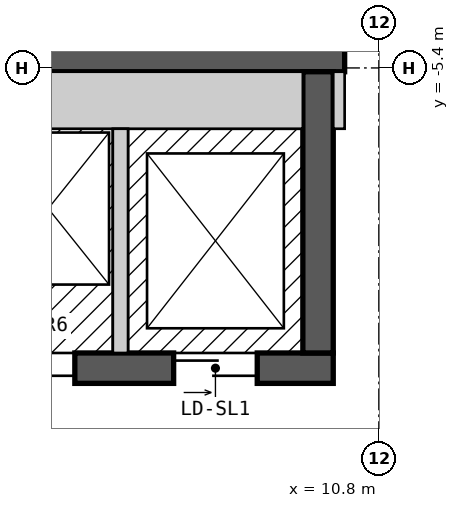
"""IFC4 building model, lengths in metres.
Left out: names, types, materials, properties, quantities, classifications, styles, units other than length and angle.
Written with IfcOpenShell. Run it as: python <this file> out.ifc"""

import sys

from ifc_helpers import new_model, si_unit, direction, frame, frame_2d, origin, place, context, subcontext, project, spatial, rectangle, extrude, element, fill, save


model = new_model("IFC4")
c1 = context("Model", 3, precision=1e-05, world=origin(), true_north=direction((0.0, 1.0)))
c2 = subcontext(c1, "Body", "Model", "MODEL_VIEW")
j1 = project(units=[si_unit("LENGTHUNIT", "METRE"), si_unit("PLANEANGLEUNIT", "RADIAN")], contexts=[c1])
p1 = place(None, origin())
s1 = spatial("IfcSite", under=j1, at=p1, CompositionType="ELEMENT")
p2 = place(p1, origin())
s2 = spatial("IfcBuilding", under=s1, at=p2, CompositionType="ELEMENT")
p3 = place(p2, frame((0.0, 0.0, 226.8)))
s3 = spatial("IfcBuildingStorey", under=s2, at=p3, CompositionType="ELEMENT", Elevation=226.8)
p4 = place(p3, frame((-13.3, -5.225, 0.0), z_axis=(0.0, 0.0, 1.0), x_axis=(1.0, 0.0, 0.0)))
e1 = element("IfcWall", 1, at=p4, inside=s3, PredefinedType="SHEAR", context=c2, shape_type="SweptSolid", body=[
    extrude(rectangle(XDim=26.6, YDim=0.45, at=frame_2d((13.3, 0.0))), origin(), (0.0, 0.0, 1.0), 2.7),
])
p5 = place(p4, frame((23.65, 0.0, 0.0)))
e2 = element("IfcOpeningElement", 2, at=p5, cuts=e1, PredefinedType="OPENING", context=c2, shape_type="SweptSolid", body=[
    extrude(rectangle(XDim=1.2, YDim=2.1, at=frame_2d((0.6, 1.05))), frame((0.0, 0.235, 0.0), z_axis=(0.0, -1.0, 0.0), x_axis=(1.0, 0.0, 0.0)), (0.0, 0.0, 1.0), 0.47),
])
p6 = place(p3, frame((-12.85, -9.35, 0.0), z_axis=(0.0, 0.0, 1.0), x_axis=(1.0, 0.0, 0.0)))
e3 = element("IfcWall", 3, at=p6, inside=s3, PredefinedType="SHEAR", context=c2, shape_type="SweptSolid", body=[
    extrude(rectangle(XDim=23.05, YDim=0.4, at=frame_2d((11.525, 0.0))), origin(), (0.0, 0.0, 1.0), 2.7),
])
p7 = place(p6, frame((1.45, 0.0, 0.0)))
e4 = element("IfcOpeningElement", 4, at=p7, cuts=e3, PredefinedType="OPENING", context=c2, shape_type="SweptSolid", body=[
    extrude(rectangle(XDim=1.1, YDim=2.1, at=frame_2d((0.55, 1.05))), frame((0.0, 0.21, 0.0), z_axis=(0.0, -1.0, 0.0), x_axis=(1.0, 0.0, 0.0)), (0.0, 0.0, 1.0), 0.42),
])
p8 = place(p6, frame((4.25, 0.0, 0.0)))
e5 = element("IfcOpeningElement", 5, at=p8, cuts=e3, PredefinedType="OPENING", context=c2, shape_type="SweptSolid", body=[
    extrude(rectangle(XDim=1.1, YDim=2.1, at=frame_2d((0.55, 1.05))), frame((0.0, 0.21, 0.0), z_axis=(0.0, -1.0, 0.0), x_axis=(1.0, 0.0, 0.0)), (0.0, 0.0, 1.0), 0.42),
])
p9 = place(p6, frame((7.05, 0.0, 0.0)))
e6 = element("IfcOpeningElement", 6, at=p9, cuts=e3, PredefinedType="OPENING", context=c2, shape_type="SweptSolid", body=[
    extrude(rectangle(XDim=1.1, YDim=2.1, at=frame_2d((0.55, 1.05))), frame((0.0, 0.21, 0.0), z_axis=(0.0, -1.0, 0.0), x_axis=(1.0, 0.0, 0.0)), (0.0, 0.0, 1.0), 0.42),
])
p10 = place(p6, frame((9.35, 0.0, 0.0)))
e7 = element("IfcOpeningElement", 7, at=p10, cuts=e3, PredefinedType="OPENING", context=c2, shape_type="SweptSolid", body=[
    extrude(rectangle(XDim=1.1, YDim=2.1, at=frame_2d((0.55, 1.05))), frame((0.0, 0.21, 0.0), z_axis=(0.0, -1.0, 0.0), x_axis=(1.0, 0.0, 0.0)), (0.0, 0.0, 1.0), 0.42),
])
p11 = place(p6, frame((11.65, 0.0, 0.0)))
e8 = element("IfcOpeningElement", 8, at=p11, cuts=e3, PredefinedType="OPENING", context=c2, shape_type="SweptSolid", body=[
    extrude(rectangle(XDim=1.1, YDim=2.1, at=frame_2d((0.55, 1.05))), frame((0.0, 0.21, 0.0), z_axis=(0.0, -1.0, 0.0), x_axis=(1.0, 0.0, 0.0)), (0.0, 0.0, 1.0), 0.42),
])
p12 = place(p6, frame((13.95, 0.0, 0.0)))
e9 = element("IfcOpeningElement", 9, at=p12, cuts=e3, PredefinedType="OPENING", context=c2, shape_type="SweptSolid", body=[
    extrude(rectangle(XDim=1.1, YDim=2.1, at=frame_2d((0.55, 1.05))), frame((0.0, 0.21, 0.0), z_axis=(0.0, -1.0, 0.0), x_axis=(1.0, 0.0, 0.0)), (0.0, 0.0, 1.0), 0.42),
])
p13 = place(p6, frame((16.25, 0.0, 0.0)))
e10 = element("IfcOpeningElement", 10, at=p13, cuts=e3, PredefinedType="OPENING", context=c2, shape_type="SweptSolid", body=[
    extrude(rectangle(XDim=1.1, YDim=2.1, at=frame_2d((0.55, 1.05))), frame((0.0, 0.21, 0.0), z_axis=(0.0, -1.0, 0.0), x_axis=(1.0, 0.0, 0.0)), (0.0, 0.0, 1.0), 0.42),
])
p14 = place(p6, frame((18.55, 0.0, 0.0)))
e11 = element("IfcOpeningElement", 11, at=p14, cuts=e3, PredefinedType="OPENING", context=c2, shape_type="SweptSolid", body=[
    extrude(rectangle(XDim=1.1, YDim=2.1, at=frame_2d((0.55, 1.05))), frame((0.0, 0.21, 0.0), z_axis=(0.0, -1.0, 0.0), x_axis=(1.0, 0.0, 0.0)), (0.0, 0.0, 1.0), 0.42),
])
p15 = place(p6, frame((20.95, 0.0, 0.0)))
e12 = element("IfcOpeningElement", 12, at=p15, cuts=e3, PredefinedType="OPENING", context=c2, shape_type="SweptSolid", body=[
    extrude(rectangle(XDim=1.1, YDim=2.1, at=frame_2d((0.55, 1.05))), frame((0.0, 0.21, 0.0), z_axis=(0.0, -1.0, 0.0), x_axis=(1.0, 0.0, 0.0)), (0.0, 0.0, 1.0), 0.42),
])
p16 = place(p3, frame((10.0, -9.15, 0.0), z_axis=(0.0, 0.0, 1.0), x_axis=(0.0, 1.0, 0.0)))
e13 = element("IfcWall", 13, at=p16, inside=s3, PredefinedType="SHEAR", context=c2, shape_type="SweptSolid", body=[
    extrude(rectangle(XDim=3.7, YDim=0.4, at=frame_2d((1.85, 0.0))), origin(), (0.0, 0.0, 1.0), 2.7),
])
p17 = place(p3, frame((-6.3, -5.825, 0.0), z_axis=(0.0, 0.0, 1.0), x_axis=(1.0, 0.0, 0.0)))
e14 = element("IfcWall", 14, at=p17, inside=s3, PredefinedType="SOLIDWALL", context=c2, shape_type="SweptSolid", body=[
    extrude(rectangle(XDim=16.1, YDim=0.75, at=frame_2d((8.05, 0.0))), origin(), (0.0, 0.0, 1.0), 2.7),
])
p18 = place(p3, frame((7.4, -9.15, 0.0), z_axis=(0.0, 0.0, 1.0), x_axis=(0.0, 1.0, 0.0)))
e15 = element("IfcWall", 15, at=p18, inside=s3, PredefinedType="SOLIDWALL", context=c2, shape_type="SweptSolid", body=[
    extrude(rectangle(XDim=2.95, YDim=0.2, at=frame_2d((1.475, 0.0))), origin(), (0.0, 0.0, 1.0), 2.7),
])
p19 = place(p3, frame((10.275, -6.2, 0.0), z_axis=(0.0, 0.0, 1.0), x_axis=(0.0, 1.0, 0.0)))
e16 = element("IfcWall", 16, at=p19, inside=s3, PredefinedType="PARTITIONING", context=c2, shape_type="SweptSolid", body=[
    extrude(rectangle(XDim=0.75, YDim=0.15, at=frame_2d((0.375, 0.0))), origin(), (0.0, 0.0, 1.0), 2.7),
])
p20 = place(p14, origin())
e17 = element("IfcDoor", 17, at=p20, inside=s3, OperationType="DOUBLE_DOOR_SLIDING", PredefinedType="DOOR", context=c2, shape_type="SweptSolid", body=[
    extrude(rectangle(XDim=1.1, YDim=2.1, at=frame_2d((0.55, 1.05))), frame((0.0, 0.025, 0.0), z_axis=(0.0, -1.0, 0.0), x_axis=(1.0, 0.0, 0.0)), (0.0, 0.0, 1.0), 0.05),
])
fill(e11, e17)
p21 = place(p15, origin())
e18 = element("IfcDoor", 18, at=p21, inside=s3, OperationType="DOUBLE_DOOR_SLIDING", PredefinedType="DOOR", context=c2, shape_type="SweptSolid", body=[
    extrude(rectangle(XDim=1.1, YDim=2.1, at=frame_2d((0.55, 1.05))), frame((0.0, 0.025, 0.0), z_axis=(0.0, -1.0, 0.0), x_axis=(1.0, 0.0, 0.0)), (0.0, 0.0, 1.0), 0.05),
])
fill(e12, e18)
p22 = place(p5, origin())
e19 = element("IfcDoor", 19, at=p22, inside=s3, OperationType="DOUBLE_DOOR_SINGLE_SWING", PredefinedType="DOOR", context=c2, shape_type="SweptSolid", body=[
    extrude(rectangle(XDim=1.2, YDim=2.1, at=frame_2d((0.6, 1.05))), frame((0.0, 0.025, 0.0), z_axis=(0.0, -1.0, 0.0), x_axis=(1.0, 0.0, 0.0)), (0.0, 0.0, 1.0), 0.05),
])
fill(e2, e19)
save(model, sys.argv[1])
